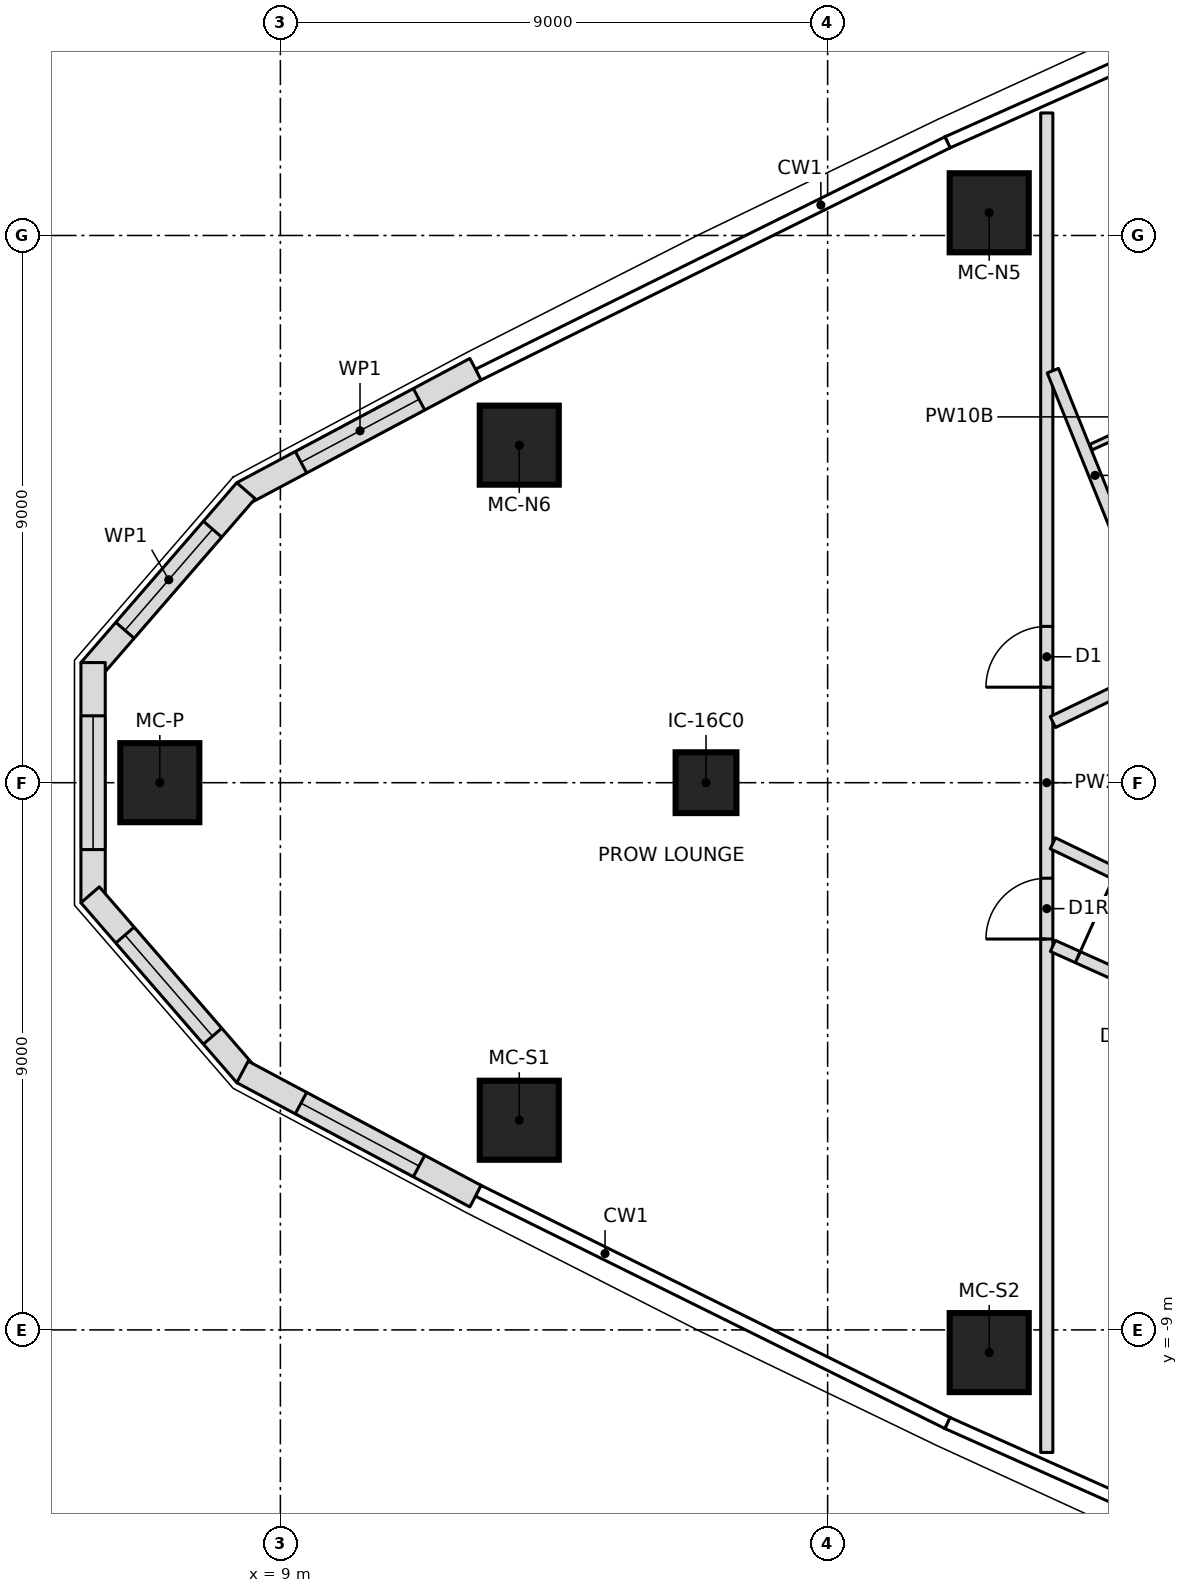
"""IFC4 building model, lengths in metres.
Left out: names, types, materials, properties, quantities, classifications, styles, units other than length and angle.
Written with IfcOpenShell. Run it as: python <this file> out.ifc"""

import sys

from ifc_helpers import new_model, si_unit, direction, frame, frame_2d, origin, origin_2d, place, context, subcontext, project, spatial, polyline, rectangle, outline, extrude, element, fill, save


model = new_model("IFC4")
c1 = context("Model", 3, precision=1e-05, world=origin(), true_north=direction((0.0, 1.0)))
c2 = subcontext(c1, "Body", "Model", "MODEL_VIEW")
j1 = project(units=[si_unit("LENGTHUNIT", "METRE"), si_unit("PLANEANGLEUNIT", "RADIAN")], contexts=[c1])
p1 = place(None, origin())
s1 = spatial("IfcSite", under=j1, at=p1, CompositionType="ELEMENT")
p2 = place(p1, origin())
s2 = spatial("IfcBuilding", under=s1, at=p2, CompositionType="ELEMENT")
p3 = place(p2, frame((0.0, 0.0, 179.05)))
s3 = spatial("IfcBuildingStorey", under=s2, at=p3, CompositionType="ELEMENT", Elevation=179.05)
for number, where, z_axis, x_axis in (
    (1, (7.017, 0.0, 0.0), (0.0, 0.0, 1.0), (1.0, 0.0, 0.0)),
    (2, (12.929, -5.552, 0.0), (0.0, 0.0, 1.0), (1.0, 0.0, 0.0)),
    (3, (20.657, -9.373, 0.0), (0.0, 0.0, 1.0), (1.0, 0.0, 0.0)),
    (4, (20.657, 9.373, 0.0), (0.0, 0.0, 1.0), (1.0, 0.0, 0.0)),
    (5, (12.929, 5.552, 0.0), (0.0, 0.0, 1.0), (1.0, 0.0, 0.0)),
):
    element("IfcColumn", number, at=place(p3, frame(where, z_axis=z_axis, x_axis=x_axis)), inside=s3, PredefinedType="COLUMN", context=c2, shape_type="SweptSolid", body=[
        extrude(rectangle(XDim=1.3, YDim=1.3, at=origin_2d()), origin(), (0.0, 0.0, 1.0), 3.55),
    ])
p4 = place(p3, frame((16.0, 0.0, 0.0), z_axis=(0.0, 0.0, 1.0), x_axis=(1.0, 0.0, 0.0)))
e6 = element("IfcColumn", 6, at=p4, inside=s3, PredefinedType="COLUMN", context=c2, shape_type="SweptSolid", body=[
    extrude(rectangle(XDim=1.0, YDim=1.0, at=origin_2d()), origin(), (0.0, 0.0, 1.0), 3.55),
])
p5 = place(p3, frame((12.21, 6.801, 0.0), z_axis=(0.0, 0.0, 1.0), x_axis=(-0.882385889746, -0.470526451518, 0.0)))
e7 = element("IfcWall", 7, at=p5, inside=s3, PredefinedType="NOTDEFINED", context=c2, shape_type="SweptSolid", body=[
    extrude(outline(polyline([(0.0, -0.2), (4.344, -0.2), (4.27, 0.2), (0.0, 0.2), (0.0, -0.2)])), origin(), (0.0, 0.0, 1.0), 3.25),
])
p6 = place(p5, frame((1.053, 0.0, 0.6)))
e8 = element("IfcOpeningElement", 8, at=p6, cuts=e7, PredefinedType="OPENING", context=c2, shape_type="SweptSolid", body=[
    extrude(outline(polyline([(0.0, 1.35), (0.084, 1.771), (0.322, 2.128), (0.679, 2.366), (1.1, 2.45), (1.521, 2.366), (1.878, 2.128), (2.116, 1.771), (2.2, 1.35), (2.2, 1.1), (2.116, 0.679), (1.878, 0.322), (1.521, 0.084), (1.1, 0.0), (0.679, 0.084), (0.322, 0.322), (0.084, 0.679), (0.0, 1.1), (0.0, 1.35)])), frame((0.0, 0.21, 0.0), z_axis=(0.0, -1.0, 0.0), x_axis=(1.0, 0.0, 0.0)), (0.0, 0.0, 1.0), 0.42),
])
p7 = place(p3, frame((8.409, 4.774, 0.0), z_axis=(0.0, 0.0, 1.0), x_axis=(-0.654759384203, -0.755837382509, 0.0)))
e9 = element("IfcWall", 9, at=p7, inside=s3, PredefinedType="NOTDEFINED", context=c2, shape_type="SweptSolid", body=[
    extrude(outline(polyline([(-0.037, -0.2), (3.876, -0.2), (3.727, 0.2), (0.037, 0.2), (-0.037, -0.2)])), origin(), (0.0, 0.0, 1.0), 3.25),
])
p8 = place(p7, frame((0.801, 0.0, 0.6)))
e10 = element("IfcOpeningElement", 10, at=p8, cuts=e9, PredefinedType="OPENING", context=c2, shape_type="SweptSolid", body=[
    extrude(outline(polyline([(0.0, 1.35), (0.084, 1.771), (0.322, 2.128), (0.679, 2.366), (1.1, 2.45), (1.521, 2.366), (1.878, 2.128), (2.116, 1.771), (2.2, 1.35), (2.2, 1.1), (2.116, 0.679), (1.878, 0.322), (1.521, 0.084), (1.1, 0.0), (0.679, 0.084), (0.322, 0.322), (0.084, 0.679), (0.0, 1.1), (0.0, 1.35)])), frame((0.0, 0.21, 0.0), z_axis=(0.0, -1.0, 0.0), x_axis=(1.0, 0.0, 0.0)), (0.0, 0.0, 1.0), 0.42),
])
p9 = place(p3, frame((5.92, 1.901, 0.0), z_axis=(0.0, 0.0, 1.0), x_axis=(0.0, -1.0, 0.0)))
e11 = element("IfcWall", 11, at=p9, inside=s3, PredefinedType="NOTDEFINED", context=c2, shape_type="SweptSolid", body=[
    extrude(outline(polyline([(-0.075, -0.2), (3.876, -0.2), (3.727, 0.2), (0.075, 0.2), (-0.075, -0.2)])), origin(), (0.0, 0.0, 1.0), 3.25),
])
p10 = place(p9, frame((0.801, 0.0, 0.6)))
e12 = element("IfcOpeningElement", 12, at=p10, cuts=e11, PredefinedType="OPENING", context=c2, shape_type="SweptSolid", body=[
    extrude(outline(polyline([(0.0, 1.35), (0.084, 1.771), (0.322, 2.128), (0.679, 2.366), (1.1, 2.45), (1.521, 2.366), (1.878, 2.128), (2.116, 1.771), (2.2, 1.35), (2.2, 1.1), (2.116, 0.679), (1.878, 0.322), (1.521, 0.084), (1.1, 0.0), (0.679, 0.084), (0.322, 0.322), (0.084, 0.679), (0.0, 1.1), (0.0, 1.35)])), frame((0.0, 0.21, 0.0), z_axis=(0.0, -1.0, 0.0), x_axis=(1.0, 0.0, 0.0)), (0.0, 0.0, 1.0), 0.42),
])
p11 = place(p3, frame((5.92, -1.901, 0.0), z_axis=(0.0, 0.0, 1.0), x_axis=(0.654759384203, -0.755837382509, 0.0)))
e13 = element("IfcWall", 13, at=p11, inside=s3, PredefinedType="NOTDEFINED", context=c2, shape_type="SweptSolid", body=[
    extrude(outline(polyline([(-0.075, -0.2), (3.839, -0.2), (3.765, 0.2), (0.075, 0.2), (-0.075, -0.2)])), origin(), (0.0, 0.0, 1.0), 3.25),
])
p12 = place(p11, frame((0.801, 0.0, 0.6)))
e14 = element("IfcOpeningElement", 14, at=p12, cuts=e13, PredefinedType="OPENING", context=c2, shape_type="SweptSolid", body=[
    extrude(outline(polyline([(0.0, 1.35), (0.084, 1.771), (0.322, 2.128), (0.679, 2.366), (1.1, 2.45), (1.521, 2.366), (1.878, 2.128), (2.116, 1.771), (2.2, 1.35), (2.2, 1.1), (2.116, 0.679), (1.878, 0.322), (1.521, 0.084), (1.1, 0.0), (0.679, 0.084), (0.322, 0.322), (0.084, 0.679), (0.0, 1.1), (0.0, 1.35)])), frame((0.0, 0.21, 0.0), z_axis=(0.0, -1.0, 0.0), x_axis=(1.0, 0.0, 0.0)), (0.0, 0.0, 1.0), 0.42),
])
p13 = place(p3, frame((8.409, -4.774, 0.0), z_axis=(0.0, 0.0, 1.0), x_axis=(0.882385889746, -0.470526451518, 0.0)))
e15 = element("IfcWall", 15, at=p13, inside=s3, PredefinedType="NOTDEFINED", context=c2, shape_type="SweptSolid", body=[
    extrude(outline(polyline([(-0.037, -0.2), (4.307, -0.2), (4.307, 0.2), (0.037, 0.2), (-0.037, -0.2)])), origin(), (0.0, 0.0, 1.0), 3.25),
])
p14 = place(p13, frame((1.053, 0.0, 0.6)))
e16 = element("IfcOpeningElement", 16, at=p14, cuts=e15, PredefinedType="OPENING", context=c2, shape_type="SweptSolid", body=[
    extrude(outline(polyline([(0.0, 1.35), (0.084, 1.771), (0.322, 2.128), (0.679, 2.366), (1.1, 2.45), (1.521, 2.366), (1.878, 2.128), (2.116, 1.771), (2.2, 1.35), (2.2, 1.1), (2.116, 0.679), (1.878, 0.322), (1.521, 0.084), (1.1, 0.0), (0.679, 0.084), (0.322, 0.322), (0.084, 0.679), (0.0, 1.1), (0.0, 1.35)])), frame((0.0, 0.21, 0.0), z_axis=(0.0, -1.0, 0.0), x_axis=(1.0, 0.0, 0.0)), (0.0, 0.0, 1.0), 0.42),
])
p15 = place(p3, frame((21.604, -11.015, 0.0), z_axis=(0.0, 0.0, 1.0), x_axis=(0.0, 1.0, 0.0)))
e17 = element("IfcWall", 17, at=p15, inside=s3, PredefinedType="PARTITIONING", context=c2, shape_type="SweptSolid", body=[
    extrude(rectangle(XDim=22.031, YDim=0.2, at=frame_2d((11.015, 0.0))), origin(), (0.0, 0.0, 1.0), 3.25),
])
p16 = place(p15, frame((12.586, 0.0, 0.0)))
e18 = element("IfcOpeningElement", 18, at=p16, cuts=e17, PredefinedType="OPENING", context=c2, shape_type="SweptSolid", body=[
    extrude(rectangle(XDim=1.0, YDim=2.1, at=frame_2d((0.5, 1.05))), frame((0.0, 0.11, 0.0), z_axis=(0.0, -1.0, 0.0), x_axis=(1.0, 0.0, 0.0)), (0.0, 0.0, 1.0), 0.22),
])
p17 = place(p15, frame((8.444, 0.0, 0.0)))
e19 = element("IfcOpeningElement", 19, at=p17, cuts=e17, PredefinedType="OPENING", context=c2, shape_type="SweptSolid", body=[
    extrude(rectangle(XDim=1.0, YDim=2.1, at=frame_2d((0.5, 1.05))), frame((0.0, 0.11, 0.0), z_axis=(0.0, -1.0, 0.0), x_axis=(1.0, 0.0, 0.0)), (0.0, 0.0, 1.0), 0.22),
])
p18 = place(p3, frame((23.092, 3.333, 0.0), z_axis=(0.0, 0.0, 1.0), x_axis=(-0.373883495288, 0.927475677283, 0.0)))
e20 = element("IfcWall", 20, at=p18, inside=s3, PredefinedType="PARTITIONING", context=c2, shape_type="SweptSolid", body=[
    extrude(rectangle(XDim=3.713, YDim=0.2, at=frame_2d((1.856, 0.0))), origin(), (0.0, 0.0, 1.0), 3.25),
])
p19 = place(p3, frame((22.33, 5.518, 0.0), z_axis=(0.0, 0.0, 1.0), x_axis=(0.909209708064, 0.416338452178, 0.0)))
e21 = element("IfcWall", 21, at=p19, inside=s3, PredefinedType="PARTITIONING", context=c2, shape_type="SweptSolid", body=[
    extrude(rectangle(XDim=2.393, YDim=0.1, at=frame_2d((1.196, 0.0))), origin(), (0.0, 0.0, 1.0), 3.25),
])
p20 = place(p19, frame((0.8, 0.0, 0.0)))
e22 = element("IfcOpeningElement", 22, at=p20, cuts=e21, PredefinedType="OPENING", context=c2, shape_type="SweptSolid", body=[
    extrude(rectangle(XDim=0.8, YDim=2.1, at=frame_2d((0.4, 1.05))), frame((0.0, 0.06, 0.0), z_axis=(0.0, -1.0, 0.0), x_axis=(1.0, 0.0, 0.0)), (0.0, 0.0, 1.0), 0.12),
])
p21 = place(p3, frame((21.704, -2.685, 0.0), z_axis=(0.0, 0.0, 1.0), x_axis=(0.912095082087, -0.409978732659, 0.0)))
e23 = element("IfcWall", 23, at=p21, inside=s3, PredefinedType="PARTITIONING", context=c2, shape_type="SweptSolid", body=[
    extrude(rectangle(XDim=10.154, YDim=0.2, at=frame_2d((5.077, 0.0))), origin(), (0.0, 0.0, 1.0), 3.25),
])
p22 = place(p21, frame((0.45, 0.0, 0.0)))
e24 = element("IfcOpeningElement", 24, at=p22, cuts=e23, PredefinedType="OPENING", context=c2, shape_type="SweptSolid", body=[
    extrude(rectangle(XDim=1.5, YDim=2.1, at=frame_2d((0.75, 1.05))), frame((0.0, 0.11, 0.0), z_axis=(0.0, -1.0, 0.0), x_axis=(1.0, 0.0, 0.0)), (0.0, 0.0, 1.0), 0.22),
])
for number, where, z_axis, x_axis in (
    (25, (23.947, -2.079, 0.0), (0.0, 0.0, 1.0), (-0.901, 0.435, 0.0)),
    (26, (21.704, 0.997, 0.0), (0.0, 0.0, 1.0), (0.901, 0.435, 0.0)),
):
    element("IfcWall", number, at=place(p3, frame(where, z_axis=z_axis, x_axis=x_axis)), inside=s3, PredefinedType="PARTITIONING", context=c2, shape_type="SweptSolid", body=[
        extrude(rectangle(XDim=2.49, YDim=0.2, at=frame_2d((1.245, 0.0))), origin(), (0.0, 0.0, 1.0), 3.25),
    ])
p23 = place(p6, origin())
e27 = element("IfcWindow", 27, at=p23, inside=s3, PartitioningType="SINGLE_PANEL", PredefinedType="WINDOW", context=c2, shape_type="SweptSolid", body=[
    extrude(outline(polyline([(0.0, 1.35), (0.084, 1.771), (0.322, 2.128), (0.679, 2.366), (1.1, 2.45), (1.521, 2.366), (1.878, 2.128), (2.116, 1.771), (2.2, 1.35), (2.2, 1.1), (2.116, 0.679), (1.878, 0.322), (1.521, 0.084), (1.1, 0.0), (0.679, 0.084), (0.322, 0.322), (0.084, 0.679), (0.0, 1.1), (0.0, 1.35)])), frame((0.0, 0.17, 0.0), z_axis=(0.0, -1.0, 0.0), x_axis=(1.0, 0.0, 0.0)), (0.0, 0.0, 1.0), 0.06),
])
fill(e8, e27)
p24 = place(p8, origin())
e28 = element("IfcWindow", 28, at=p24, inside=s3, PartitioningType="SINGLE_PANEL", PredefinedType="WINDOW", context=c2, shape_type="SweptSolid", body=[
    extrude(outline(polyline([(0.0, 1.35), (0.084, 1.771), (0.322, 2.128), (0.679, 2.366), (1.1, 2.45), (1.521, 2.366), (1.878, 2.128), (2.116, 1.771), (2.2, 1.35), (2.2, 1.1), (2.116, 0.679), (1.878, 0.322), (1.521, 0.084), (1.1, 0.0), (0.679, 0.084), (0.322, 0.322), (0.084, 0.679), (0.0, 1.1), (0.0, 1.35)])), frame((0.0, 0.17, 0.0), z_axis=(0.0, -1.0, 0.0), x_axis=(1.0, 0.0, 0.0)), (0.0, 0.0, 1.0), 0.06),
])
fill(e10, e28)
p25 = place(p10, origin())
e29 = element("IfcWindow", 29, at=p25, inside=s3, PartitioningType="SINGLE_PANEL", PredefinedType="WINDOW", context=c2, shape_type="SweptSolid", body=[
    extrude(outline(polyline([(0.0, 1.35), (0.084, 1.771), (0.322, 2.128), (0.679, 2.366), (1.1, 2.45), (1.521, 2.366), (1.878, 2.128), (2.116, 1.771), (2.2, 1.35), (2.2, 1.1), (2.116, 0.679), (1.878, 0.322), (1.521, 0.084), (1.1, 0.0), (0.679, 0.084), (0.322, 0.322), (0.084, 0.679), (0.0, 1.1), (0.0, 1.35)])), frame((0.0, 0.17, 0.0), z_axis=(0.0, -1.0, 0.0), x_axis=(1.0, 0.0, 0.0)), (0.0, 0.0, 1.0), 0.06),
])
fill(e12, e29)
p26 = place(p12, origin())
e30 = element("IfcWindow", 30, at=p26, inside=s3, PartitioningType="SINGLE_PANEL", PredefinedType="WINDOW", context=c2, shape_type="SweptSolid", body=[
    extrude(outline(polyline([(0.0, 1.35), (0.084, 1.771), (0.322, 2.128), (0.679, 2.366), (1.1, 2.45), (1.521, 2.366), (1.878, 2.128), (2.116, 1.771), (2.2, 1.35), (2.2, 1.1), (2.116, 0.679), (1.878, 0.322), (1.521, 0.084), (1.1, 0.0), (0.679, 0.084), (0.322, 0.322), (0.084, 0.679), (0.0, 1.1), (0.0, 1.35)])), frame((0.0, 0.17, 0.0), z_axis=(0.0, -1.0, 0.0), x_axis=(1.0, 0.0, 0.0)), (0.0, 0.0, 1.0), 0.06),
])
fill(e14, e30)
p27 = place(p14, origin())
e31 = element("IfcWindow", 31, at=p27, inside=s3, PartitioningType="SINGLE_PANEL", PredefinedType="WINDOW", context=c2, shape_type="SweptSolid", body=[
    extrude(outline(polyline([(0.0, 1.35), (0.084, 1.771), (0.322, 2.128), (0.679, 2.366), (1.1, 2.45), (1.521, 2.366), (1.878, 2.128), (2.116, 1.771), (2.2, 1.35), (2.2, 1.1), (2.116, 0.679), (1.878, 0.322), (1.521, 0.084), (1.1, 0.0), (0.679, 0.084), (0.322, 0.322), (0.084, 0.679), (0.0, 1.1), (0.0, 1.35)])), frame((0.0, 0.17, 0.0), z_axis=(0.0, -1.0, 0.0), x_axis=(1.0, 0.0, 0.0)), (0.0, 0.0, 1.0), 0.06),
])
fill(e16, e31)
p28 = place(p16, origin())
e32 = element("IfcDoor", 32, at=p28, inside=s3, OperationType="SINGLE_SWING_LEFT", PredefinedType="DOOR", context=c2, shape_type="SweptSolid", body=[
    extrude(rectangle(XDim=1.0, YDim=2.1, at=frame_2d((0.5, 1.05))), frame((0.0, 0.025, 0.0), z_axis=(0.0, -1.0, 0.0), x_axis=(1.0, 0.0, 0.0)), (0.0, 0.0, 1.0), 0.05),
])
fill(e18, e32)
p29 = place(p17, origin())
e33 = element("IfcDoor", 33, at=p29, inside=s3, OperationType="SINGLE_SWING_RIGHT", PredefinedType="DOOR", context=c2, shape_type="SweptSolid", body=[
    extrude(rectangle(XDim=1.0, YDim=2.1, at=frame_2d((0.5, 1.05))), frame((0.0, 0.025, 0.0), z_axis=(0.0, -1.0, 0.0), x_axis=(1.0, 0.0, 0.0)), (0.0, 0.0, 1.0), 0.05),
])
fill(e19, e33)
p30 = place(p22, origin())
e34 = element("IfcDoor", 34, at=p30, inside=s3, OperationType="DOUBLE_DOOR_SINGLE_SWING", PredefinedType="DOOR", context=c2, shape_type="SweptSolid", body=[
    extrude(rectangle(XDim=1.5, YDim=2.1, at=frame_2d((0.75, 1.05))), frame((0.0, 0.025, 0.0), z_axis=(0.0, -1.0, 0.0), x_axis=(1.0, 0.0, 0.0)), (0.0, 0.0, 1.0), 0.05),
])
fill(e24, e34)
save(model, sys.argv[1])
